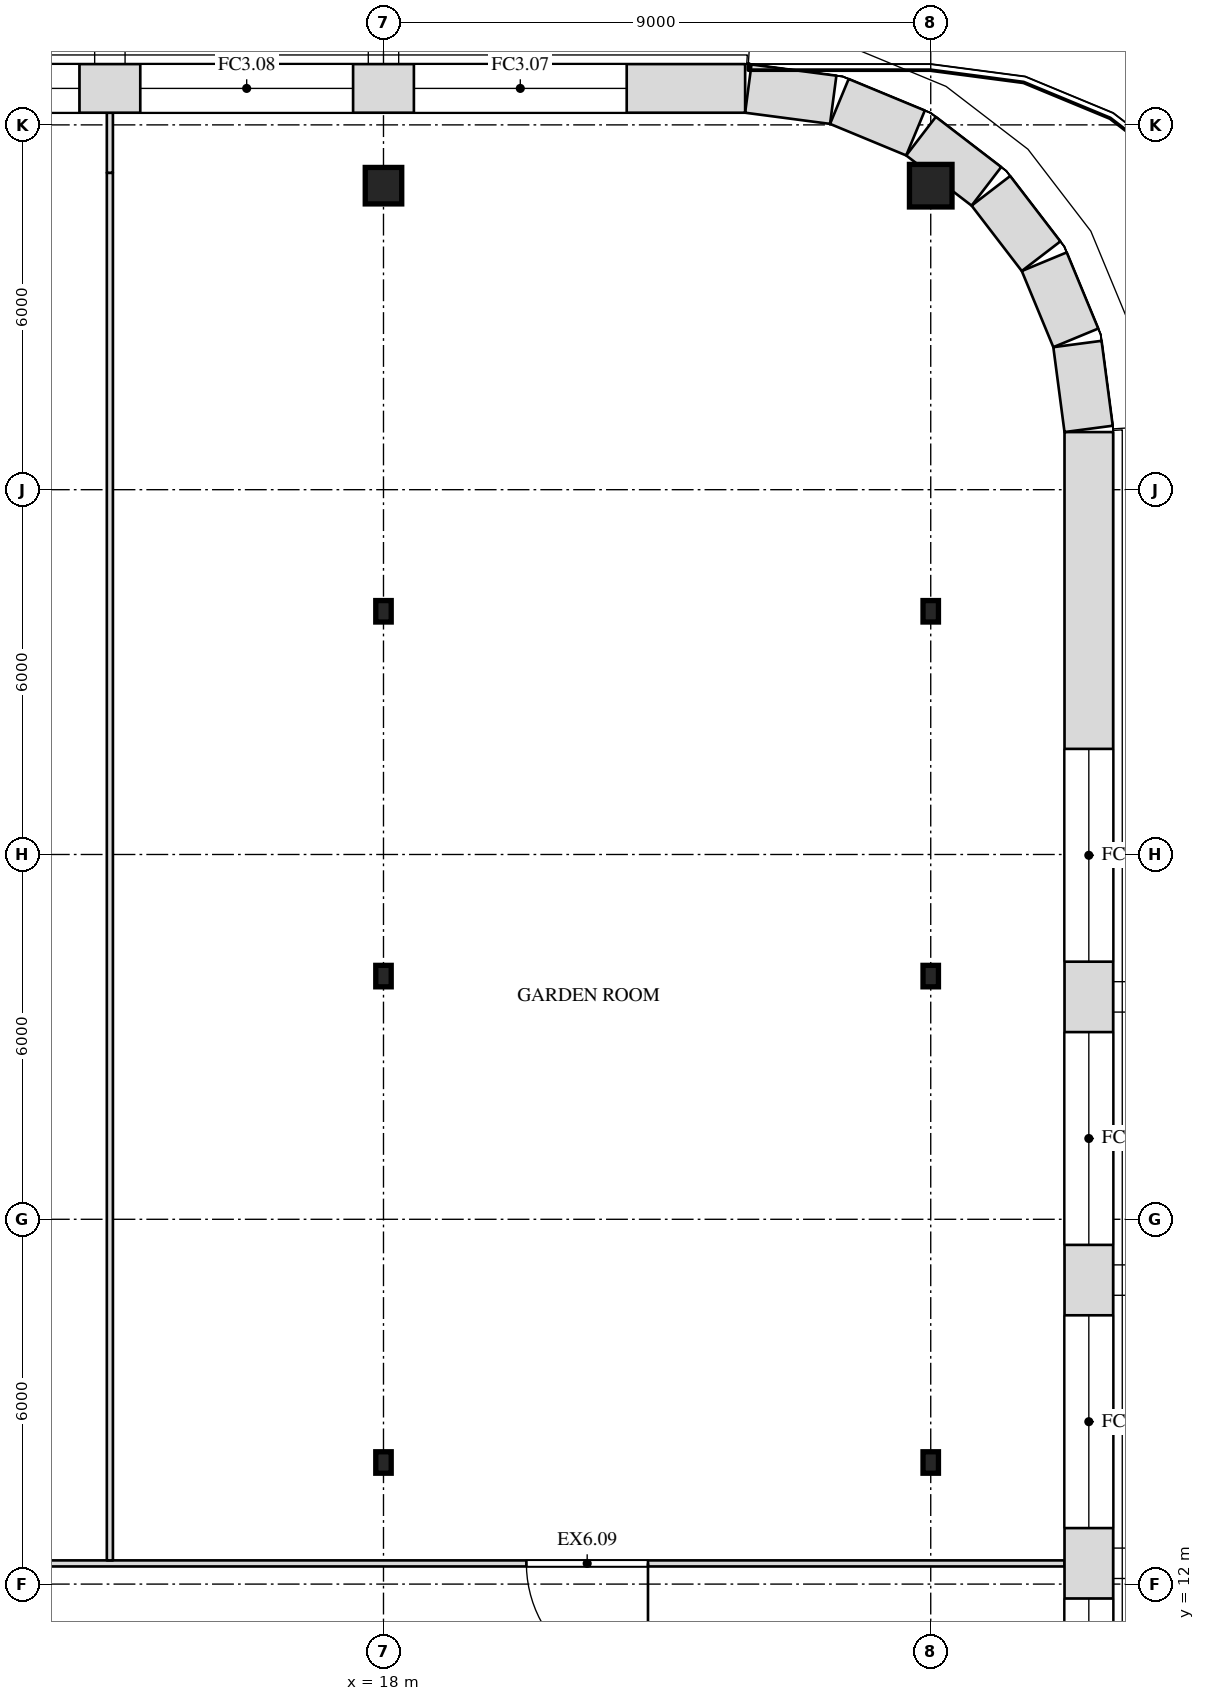
"""IFC4 building model, lengths in metres.
Left out: names, types, materials, properties, quantities, classifications, styles, units other than length and angle.
Written with IfcOpenShell. Run it as: python <this file> out.ifc"""

import sys

from ifc_helpers import new_model, si_unit, direction, frame, frame_2d, origin, origin_2d, place, context, subcontext, project, spatial, rectangle, i_section, extrude, element, fill, save


model = new_model("IFC4")
c1 = context("Model", 3, precision=1e-05, world=origin(), true_north=direction((0.0, 1.0)))
c2 = subcontext(c1, "Body", "Model", "MODEL_VIEW")
j1 = project(units=[si_unit("LENGTHUNIT", "METRE"), si_unit("PLANEANGLEUNIT", "RADIAN")], contexts=[c1])
p1 = place(None, origin())
s1 = spatial("IfcSite", under=j1, at=p1, CompositionType="ELEMENT")
p2 = place(p1, origin())
s2 = spatial("IfcBuilding", under=s1, at=p2, CompositionType="ELEMENT")
p3 = place(p2, frame((0.0, 0.0, 292.5)))
s3 = spatial("IfcBuildingStorey", under=s2, at=p3, CompositionType="ELEMENT", Elevation=292.5)
for number, where, z_axis, x_axis in (
    (1, (18.0, 14.0, 0.0), (0.0, 0.0, 1.0), (1.0, 0.0, 0.0)),
    (2, (27.0, 14.0, 0.0), (0.0, 0.0, 1.0), (1.0, 0.0, 0.0)),
    (3, (18.0, 22.0, 0.0), (0.0, 0.0, 1.0), (1.0, 0.0, 0.0)),
    (4, (27.0, 22.0, 0.0), (0.0, 0.0, 1.0), (1.0, 0.0, 0.0)),
    (5, (18.0, 28.0, 0.0), (0.0, 0.0, 1.0), (1.0, 0.0, 0.0)),
    (6, (27.0, 28.0, 0.0), (0.0, 0.0, 1.0), (1.0, 0.0, 0.0)),
):
    element("IfcColumn", number, at=place(p3, frame(where, z_axis=z_axis, x_axis=x_axis)), inside=s3, PredefinedType="COLUMN", context=c2, shape_type="SweptSolid", body=[
        extrude(i_section(OverallWidth=0.254, OverallDepth=0.353, WebThickness=0.01, FlangeThickness=0.016, at=origin_2d()), origin(), (0.0, 0.0, 1.0), 4.0),
    ])
p4 = place(p3, frame((18.0, 35.0, 0.0), z_axis=(0.0, 0.0, 1.0), x_axis=(1.0, 0.0, 0.0)))
e7 = element("IfcColumn", 7, at=p4, inside=s3, PredefinedType="COLUMN", context=c2, shape_type="SweptSolid", body=[
    extrude(rectangle(XDim=0.6, YDim=0.6, at=origin_2d()), origin(), (0.0, 0.0, 1.0), 4.0),
])
p5 = place(p3, frame((27.0, 35.0, 0.0), z_axis=(0.0, 0.0, 1.0), x_axis=(1.0, 0.0, 0.0)))
e8 = element("IfcColumn", 8, at=p5, inside=s3, PredefinedType="COLUMN", context=c2, shape_type="SweptSolid", body=[
    extrude(rectangle(XDim=0.7, YDim=0.7, at=origin_2d()), origin(), (0.0, 0.0, 1.0), 4.0),
])
p6 = place(p3, frame((-29.2, 12.34, 0.0), z_axis=(0.0, 0.0, 1.0), x_axis=(1.0, 0.0, 0.0)))
e9 = element("IfcWall", 9, at=p6, inside=s3, PredefinedType="PARTITIONING", context=c2, shape_type="SweptSolid", body=[
    extrude(rectangle(XDim=58.4, YDim=0.1, at=frame_2d((29.2, 0.0))), origin(), (0.0, 0.0, 1.0), 3.6),
])
p7 = place(p6, frame((6.95, 0.0, 0.0)))
e10 = element("IfcOpeningElement", 10, at=p7, cuts=e9, PredefinedType="OPENING", context=c2, shape_type="SweptSolid", body=[
    extrude(rectangle(XDim=1.8, YDim=2.1, at=frame_2d((0.9, 1.05))), frame((0.0, 0.062, 0.0), z_axis=(0.0, -1.0, 0.0), x_axis=(1.0, 0.0, 0.0)), (0.0, 0.0, 1.0), 0.124),
])
p8 = place(p6, frame((24.2, 0.0, 0.0)))
e11 = element("IfcOpeningElement", 11, at=p8, cuts=e9, PredefinedType="OPENING", context=c2, shape_type="SweptSolid", body=[
    extrude(rectangle(XDim=2.0, YDim=2.4, at=frame_2d((1.0, 1.2))), frame((0.0, 0.062, 0.0), z_axis=(0.0, -1.0, 0.0), x_axis=(1.0, 0.0, 0.0)), (0.0, 0.0, 1.0), 0.124),
])
p9 = place(p6, frame((32.2, 0.0, 0.0)))
e12 = element("IfcOpeningElement", 12, at=p9, cuts=e9, PredefinedType="OPENING", context=c2, shape_type="SweptSolid", body=[
    extrude(rectangle(XDim=2.0, YDim=2.4, at=frame_2d((1.0, 1.2))), frame((0.0, 0.062, 0.0), z_axis=(0.0, -1.0, 0.0), x_axis=(1.0, 0.0, 0.0)), (0.0, 0.0, 1.0), 0.124),
])
p10 = place(p6, frame((49.55, 0.0, 0.0)))
e13 = element("IfcOpeningElement", 13, at=p10, cuts=e9, PredefinedType="OPENING", context=c2, shape_type="SweptSolid", body=[
    extrude(rectangle(XDim=2.0, YDim=2.4, at=frame_2d((1.0, 1.2))), frame((0.0, 0.062, 0.0), z_axis=(0.0, -1.0, 0.0), x_axis=(1.0, 0.0, 0.0)), (0.0, 0.0, 1.0), 0.124),
])
p11 = place(p3, frame((13.5, 12.39, 0.0), z_axis=(0.0, 0.0, 1.0), x_axis=(0.0, 1.0, 0.0)))
e14 = element("IfcWall", 14, at=p11, inside=s3, PredefinedType="PARTITIONING", context=c2, shape_type="SweptSolid", body=[
    extrude(rectangle(XDim=22.822, YDim=0.1, at=frame_2d((11.411, 0.0))), origin(), (0.0, 0.0, 1.0), 2.988),
])
p12 = place(p3, frame((13.5, 35.212, 0.0), z_axis=(0.0, 0.0, 1.0), x_axis=(0.0, 1.0, 0.0)))
e15 = element("IfcWall", 15, at=p12, inside=s3, PredefinedType="PARTITIONING", context=c2, shape_type="SweptSolid", body=[
    extrude(rectangle(XDim=0.988, YDim=0.1, at=frame_2d((0.494, 0.0))), origin(), (0.0, 0.0, 1.0), 3.6),
])
p13 = place(p3, frame((29.6, -10.895, 0.0), z_axis=(0.0, 0.0, 1.0), x_axis=(0.0, 1.0, 0.0)))
e16 = element("IfcWall", 16, at=p13, inside=s3, PredefinedType="SOLIDWALL", context=c2, shape_type="SweptSolid", body=[
    extrude(rectangle(XDim=41.842, YDim=0.8, at=frame_2d((20.921, 0.0))), origin(), (0.0, 0.0, 1.0), 3.6),
])
p14 = place(p13, frame((5.184, 0.0, 1.0)))
e17 = element("IfcOpeningElement", 17, at=p14, cuts=e16, PredefinedType="OPENING", context=c2, shape_type="SweptSolid", body=[
    extrude(rectangle(XDim=3.5, YDim=2.3, at=frame_2d((1.75, 1.15))), frame((0.0, 0.412, 0.0), z_axis=(0.0, -1.0, 0.0), x_axis=(1.0, 0.0, 0.0)), (0.0, 0.0, 1.0), 0.824),
])
p15 = place(p13, frame((9.842, 0.0, 1.0)))
e18 = element("IfcOpeningElement", 18, at=p15, cuts=e16, PredefinedType="OPENING", context=c2, shape_type="SweptSolid", body=[
    extrude(rectangle(XDim=3.5, YDim=2.3, at=frame_2d((1.75, 1.15))), frame((0.0, 0.412, 0.0), z_axis=(0.0, -1.0, 0.0), x_axis=(1.0, 0.0, 0.0)), (0.0, 0.0, 1.0), 0.824),
])
p16 = place(p13, frame((19.158, 0.0, 1.0)))
e19 = element("IfcOpeningElement", 19, at=p16, cuts=e16, PredefinedType="OPENING", context=c2, shape_type="SweptSolid", body=[
    extrude(rectangle(XDim=3.5, YDim=2.3, at=frame_2d((1.75, 1.15))), frame((0.0, 0.412, 0.0), z_axis=(0.0, -1.0, 0.0), x_axis=(1.0, 0.0, 0.0)), (0.0, 0.0, 1.0), 0.824),
])
p17 = place(p13, frame((23.816, 0.0, 1.0)))
e20 = element("IfcOpeningElement", 20, at=p17, cuts=e16, PredefinedType="OPENING", context=c2, shape_type="SweptSolid", body=[
    extrude(rectangle(XDim=3.5, YDim=2.3, at=frame_2d((1.75, 1.15))), frame((0.0, 0.412, 0.0), z_axis=(0.0, -1.0, 0.0), x_axis=(1.0, 0.0, 0.0)), (0.0, 0.0, 1.0), 0.824),
])
p18 = place(p13, frame((28.474, 0.0, 1.0)))
e21 = element("IfcOpeningElement", 21, at=p18, cuts=e16, PredefinedType="OPENING", context=c2, shape_type="SweptSolid", body=[
    extrude(rectangle(XDim=3.5, YDim=2.3, at=frame_2d((1.75, 1.15))), frame((0.0, 0.412, 0.0), z_axis=(0.0, -1.0, 0.0), x_axis=(1.0, 0.0, 0.0)), (0.0, 0.0, 1.0), 0.824),
])
p19 = place(p13, frame((33.132, 0.0, 1.0)))
e22 = element("IfcOpeningElement", 22, at=p19, cuts=e16, PredefinedType="OPENING", context=c2, shape_type="SweptSolid", body=[
    extrude(rectangle(XDim=3.5, YDim=2.3, at=frame_2d((1.75, 1.15))), frame((0.0, 0.412, 0.0), z_axis=(0.0, -1.0, 0.0), x_axis=(1.0, 0.0, 0.0)), (0.0, 0.0, 1.0), 0.824),
])
p20 = place(p13, frame((16.279, 0.0, 0.0)))
e23 = element("IfcOpeningElement", 23, at=p20, cuts=e16, PredefinedType="OPENING", context=c2, shape_type="SweptSolid", body=[
    extrude(rectangle(XDim=1.8, YDim=2.4, at=frame_2d((0.9, 1.2))), frame((0.0, 0.412, 0.0), z_axis=(0.0, -1.0, 0.0), x_axis=(1.0, 0.0, 0.0)), (0.0, 0.0, 1.0), 0.824),
])
p21 = place(p3, frame((29.597, 31.0, 0.0), z_axis=(0.0, 0.0, 1.0), x_axis=(-0.130517283865, 0.99144603414, 0.0)))
e24 = element("IfcWall", 24, at=p21, inside=s3, PredefinedType="SOLIDWALL", context=c2, shape_type="SweptSolid", body=[
    extrude(rectangle(XDim=1.408, YDim=0.8, at=frame_2d((0.704, 0.0))), origin(), (0.0, 0.0, 1.0), 3.6),
])
p22 = place(p3, frame((29.386, 32.497, 0.0), z_axis=(0.0, 0.0, 1.0), x_axis=(-0.38276009378, 0.923847774587, 0.0)))
e25 = element("IfcWall", 25, at=p22, inside=s3, PredefinedType="SOLIDWALL", context=c2, shape_type="SweptSolid", body=[
    extrude(rectangle(XDim=1.355, YDim=0.8, at=frame_2d((0.678, 0.0))), origin(), (0.0, 0.0, 1.0), 3.6),
])
for number, where, z_axis, x_axis in (
    (26, (28.815, 33.84, 0.0), (0.0, 0.0, 1.0), (-0.609, 0.793, 0.0)),
    (27, (27.916, 34.989, 0.0), (0.0, 0.0, 1.0), (-0.793, 0.609, 0.0)),
):
    element("IfcWall", number, at=place(p3, frame(where, z_axis=z_axis, x_axis=x_axis)), inside=s3, PredefinedType="SOLIDWALL", context=c2, shape_type="SweptSolid", body=[
        extrude(rectangle(XDim=1.356, YDim=0.8, at=frame_2d((0.678, 0.0))), origin(), (0.0, 0.0, 1.0), 3.6),
    ])
p23 = place(p3, frame((26.75, 35.867, 0.0), z_axis=(0.0, 0.0, 1.0), x_axis=(-0.923847774587, 0.38276009378, 0.0)))
e28 = element("IfcWall", 28, at=p23, inside=s3, PredefinedType="SOLIDWALL", context=c2, shape_type="SweptSolid", body=[
    extrude(rectangle(XDim=1.355, YDim=0.8, at=frame_2d((0.678, 0.0))), origin(), (0.0, 0.0, 1.0), 3.6),
])
p24 = place(p3, frame((25.396, 36.413, 0.0), z_axis=(0.0, 0.0, 1.0), x_axis=(-0.99144603414, 0.130517283865, 0.0)))
e29 = element("IfcWall", 29, at=p24, inside=s3, PredefinedType="SOLIDWALL", context=c2, shape_type="SweptSolid", body=[
    extrude(rectangle(XDim=1.408, YDim=0.8, at=frame_2d((0.704, 0.0))), origin(), (0.0, 0.0, 1.0), 3.6),
])
p25 = place(p3, frame((23.948, 36.6, 0.0), z_axis=(0.0, 0.0, 1.0), x_axis=(-1.0, 0.0, 0.0)))
e30 = element("IfcWall", 30, at=p25, inside=s3, PredefinedType="SOLIDWALL", context=c2, shape_type="SweptSolid", body=[
    extrude(rectangle(XDim=47.895, YDim=0.8, at=frame_2d((23.948, 0.0))), origin(), (0.0, 0.0, 1.0), 3.6),
])
p26 = place(p25, frame((1.948, 0.0, 1.0)))
e31 = element("IfcOpeningElement", 31, at=p26, cuts=e30, PredefinedType="OPENING", context=c2, shape_type="SweptSolid", body=[
    extrude(rectangle(XDim=3.5, YDim=2.3, at=frame_2d((1.75, 1.15))), frame((0.0, 0.412, 0.0), z_axis=(0.0, -1.0, 0.0), x_axis=(1.0, 0.0, 0.0)), (0.0, 0.0, 1.0), 0.824),
])
p27 = place(p25, frame((6.448, 0.0, 1.0)))
e32 = element("IfcOpeningElement", 32, at=p27, cuts=e30, PredefinedType="OPENING", context=c2, shape_type="SweptSolid", body=[
    extrude(rectangle(XDim=3.5, YDim=2.3, at=frame_2d((1.75, 1.15))), frame((0.0, 0.412, 0.0), z_axis=(0.0, -1.0, 0.0), x_axis=(1.0, 0.0, 0.0)), (0.0, 0.0, 1.0), 0.824),
])
p28 = place(p25, frame((10.948, 0.0, 1.0)))
e33 = element("IfcOpeningElement", 33, at=p28, cuts=e30, PredefinedType="OPENING", context=c2, shape_type="SweptSolid", body=[
    extrude(rectangle(XDim=3.5, YDim=2.3, at=frame_2d((1.75, 1.15))), frame((0.0, 0.412, 0.0), z_axis=(0.0, -1.0, 0.0), x_axis=(1.0, 0.0, 0.0)), (0.0, 0.0, 1.0), 0.824),
])
p29 = place(p25, frame((15.448, 0.0, 1.0)))
e34 = element("IfcOpeningElement", 34, at=p29, cuts=e30, PredefinedType="OPENING", context=c2, shape_type="SweptSolid", body=[
    extrude(rectangle(XDim=3.5, YDim=2.3, at=frame_2d((1.75, 1.15))), frame((0.0, 0.412, 0.0), z_axis=(0.0, -1.0, 0.0), x_axis=(1.0, 0.0, 0.0)), (0.0, 0.0, 1.0), 0.824),
])
p30 = place(p25, frame((19.948, 0.0, 1.0)))
e35 = element("IfcOpeningElement", 35, at=p30, cuts=e30, PredefinedType="OPENING", context=c2, shape_type="SweptSolid", body=[
    extrude(rectangle(XDim=3.5, YDim=2.3, at=frame_2d((1.75, 1.15))), frame((0.0, 0.412, 0.0), z_axis=(0.0, -1.0, 0.0), x_axis=(1.0, 0.0, 0.0)), (0.0, 0.0, 1.0), 0.824),
])
p31 = place(p25, frame((24.448, 0.0, 1.0)))
e36 = element("IfcOpeningElement", 36, at=p31, cuts=e30, PredefinedType="OPENING", context=c2, shape_type="SweptSolid", body=[
    extrude(rectangle(XDim=3.5, YDim=2.3, at=frame_2d((1.75, 1.15))), frame((0.0, 0.412, 0.0), z_axis=(0.0, -1.0, 0.0), x_axis=(1.0, 0.0, 0.0)), (0.0, 0.0, 1.0), 0.824),
])
p32 = place(p25, frame((28.948, 0.0, 1.0)))
e37 = element("IfcOpeningElement", 37, at=p32, cuts=e30, PredefinedType="OPENING", context=c2, shape_type="SweptSolid", body=[
    extrude(rectangle(XDim=3.5, YDim=2.3, at=frame_2d((1.75, 1.15))), frame((0.0, 0.412, 0.0), z_axis=(0.0, -1.0, 0.0), x_axis=(1.0, 0.0, 0.0)), (0.0, 0.0, 1.0), 0.824),
])
p33 = place(p25, frame((33.448, 0.0, 1.0)))
e38 = element("IfcOpeningElement", 38, at=p33, cuts=e30, PredefinedType="OPENING", context=c2, shape_type="SweptSolid", body=[
    extrude(rectangle(XDim=3.5, YDim=2.3, at=frame_2d((1.75, 1.15))), frame((0.0, 0.412, 0.0), z_axis=(0.0, -1.0, 0.0), x_axis=(1.0, 0.0, 0.0)), (0.0, 0.0, 1.0), 0.824),
])
p34 = place(p25, frame((37.948, 0.0, 1.0)))
e39 = element("IfcOpeningElement", 39, at=p34, cuts=e30, PredefinedType="OPENING", context=c2, shape_type="SweptSolid", body=[
    extrude(rectangle(XDim=3.5, YDim=2.3, at=frame_2d((1.75, 1.15))), frame((0.0, 0.412, 0.0), z_axis=(0.0, -1.0, 0.0), x_axis=(1.0, 0.0, 0.0)), (0.0, 0.0, 1.0), 0.824),
])
p35 = place(p25, frame((42.448, 0.0, 1.0)))
e40 = element("IfcOpeningElement", 40, at=p35, cuts=e30, PredefinedType="OPENING", context=c2, shape_type="SweptSolid", body=[
    extrude(rectangle(XDim=3.5, YDim=2.3, at=frame_2d((1.75, 1.15))), frame((0.0, 0.412, 0.0), z_axis=(0.0, -1.0, 0.0), x_axis=(1.0, 0.0, 0.0)), (0.0, 0.0, 1.0), 0.824),
])
p36 = place(p10, origin())
e41 = element("IfcDoor", 41, at=p36, inside=s3, OperationType="DOUBLE_DOOR_SINGLE_SWING", PredefinedType="DOOR", context=c2, shape_type="SweptSolid", body=[
    extrude(rectangle(XDim=2.0, YDim=2.4, at=frame_2d((1.0, 1.2))), frame((0.0, 0.025, 0.0), z_axis=(0.0, -1.0, 0.0), x_axis=(1.0, 0.0, 0.0)), (0.0, 0.0, 1.0), 0.05),
])
fill(e13, e41)
p37 = place(p16, origin())
e42 = element("IfcWindow", 42, at=p37, inside=s3, PartitioningType="SINGLE_PANEL", PredefinedType="WINDOW", context=c2, shape_type="SweptSolid", body=[
    extrude(rectangle(XDim=3.5, YDim=2.3, at=frame_2d((1.75, 1.15))), frame((0.0, 0.03, 0.0), z_axis=(0.0, -1.0, 0.0), x_axis=(1.0, 0.0, 0.0)), (0.0, 0.0, 1.0), 0.06),
])
fill(e19, e42)
p38 = place(p17, origin())
e43 = element("IfcWindow", 43, at=p38, inside=s3, PartitioningType="SINGLE_PANEL", PredefinedType="WINDOW", context=c2, shape_type="SweptSolid", body=[
    extrude(rectangle(XDim=3.5, YDim=2.3, at=frame_2d((1.75, 1.15))), frame((0.0, 0.03, 0.0), z_axis=(0.0, -1.0, 0.0), x_axis=(1.0, 0.0, 0.0)), (0.0, 0.0, 1.0), 0.06),
])
fill(e20, e43)
p39 = place(p18, origin())
e44 = element("IfcWindow", 44, at=p39, inside=s3, PartitioningType="SINGLE_PANEL", PredefinedType="WINDOW", context=c2, shape_type="SweptSolid", body=[
    extrude(rectangle(XDim=3.5, YDim=2.3, at=frame_2d((1.75, 1.15))), frame((0.0, 0.03, 0.0), z_axis=(0.0, -1.0, 0.0), x_axis=(1.0, 0.0, 0.0)), (0.0, 0.0, 1.0), 0.06),
])
fill(e21, e44)
p40 = place(p19, origin())
e45 = element("IfcWindow", 45, at=p40, inside=s3, PartitioningType="SINGLE_PANEL", PredefinedType="WINDOW", context=c2, shape_type="SweptSolid", body=[
    extrude(rectangle(XDim=3.5, YDim=2.3, at=frame_2d((1.75, 1.15))), frame((0.0, 0.03, 0.0), z_axis=(0.0, -1.0, 0.0), x_axis=(1.0, 0.0, 0.0)), (0.0, 0.0, 1.0), 0.06),
])
fill(e22, e45)
p41 = place(p26, origin())
e46 = element("IfcWindow", 46, at=p41, inside=s3, PartitioningType="SINGLE_PANEL", PredefinedType="WINDOW", context=c2, shape_type="SweptSolid", body=[
    extrude(rectangle(XDim=3.5, YDim=2.3, at=frame_2d((1.75, 1.15))), frame((0.0, 0.03, 0.0), z_axis=(0.0, -1.0, 0.0), x_axis=(1.0, 0.0, 0.0)), (0.0, 0.0, 1.0), 0.06),
])
fill(e31, e46)
p42 = place(p27, origin())
e47 = element("IfcWindow", 47, at=p42, inside=s3, PartitioningType="SINGLE_PANEL", PredefinedType="WINDOW", context=c2, shape_type="SweptSolid", body=[
    extrude(rectangle(XDim=3.5, YDim=2.3, at=frame_2d((1.75, 1.15))), frame((0.0, 0.03, 0.0), z_axis=(0.0, -1.0, 0.0), x_axis=(1.0, 0.0, 0.0)), (0.0, 0.0, 1.0), 0.06),
])
fill(e32, e47)
p43 = place(p28, origin())
e48 = element("IfcWindow", 48, at=p43, inside=s3, PartitioningType="SINGLE_PANEL", PredefinedType="WINDOW", context=c2, shape_type="SweptSolid", body=[
    extrude(rectangle(XDim=3.5, YDim=2.3, at=frame_2d((1.75, 1.15))), frame((0.0, 0.03, 0.0), z_axis=(0.0, -1.0, 0.0), x_axis=(1.0, 0.0, 0.0)), (0.0, 0.0, 1.0), 0.06),
])
fill(e33, e48)
save(model, sys.argv[1])
